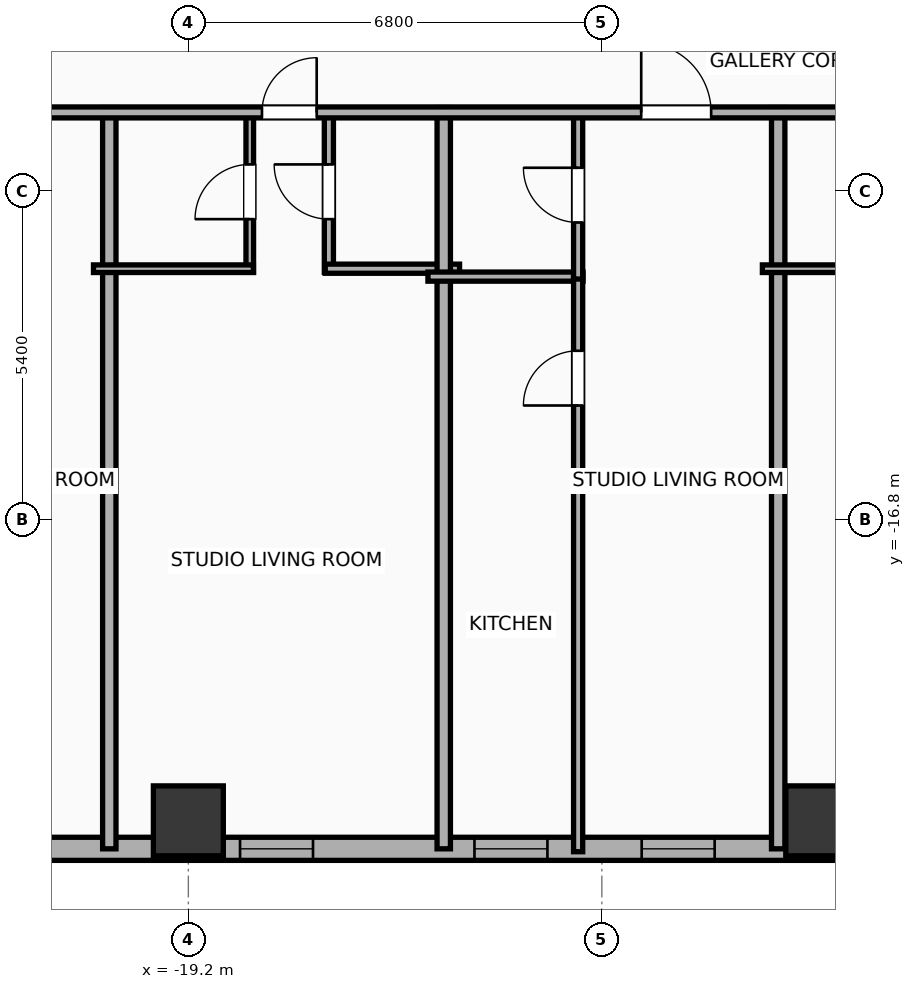
"""IFC4 building model, lengths in metres.
Left out: names, types, materials, properties, quantities, classifications, styles, units other than length and angle.
Written with IfcOpenShell. Run it as: python <this file> out.ifc"""

import sys

from ifc_helpers import new_model, si_unit, direction, frame, frame_2d, origin, origin_2d, place, context, subcontext, project, spatial, rectangle, hollow_rectangle, extrude, element, fill, save


model = new_model("IFC4")
c1 = context("Model", 3, precision=1e-05, world=origin(), true_north=direction((0.0, 1.0)))
c2 = subcontext(c1, "Body", "Model", "MODEL_VIEW")
j1 = project(units=[si_unit("LENGTHUNIT", "METRE"), si_unit("PLANEANGLEUNIT", "RADIAN")], contexts=[c1])
p1 = place(None, origin())
s1 = spatial("IfcSite", under=j1, at=p1, CompositionType="ELEMENT")
p2 = place(p1, origin())
s2 = spatial("IfcBuilding", under=s1, at=p2, CompositionType="ELEMENT")
p3 = place(p2, frame((0.0, 0.0, 33.8)))
s3 = spatial("IfcBuildingStorey", under=s2, at=p3, CompositionType="ELEMENT", Elevation=33.8)
for number, where, z_axis, x_axis in (
    (1, (-19.2, -21.75, 0.0), (0.0, 0.0, 1.0), (1.0, 0.0, 0.0)),
    (2, (-8.8, -21.75, 0.0), (0.0, 0.0, 1.0), (1.0, 0.0, 0.0)),
):
    element("IfcColumn", number, at=place(p3, frame(where, z_axis=z_axis, x_axis=x_axis)), inside=s3, PredefinedType="COLUMN", context=c2, shape_type="SweptSolid", body=[
        extrude(hollow_rectangle(XDim=1.15, YDim=1.15, WallThickness=0.04, at=origin_2d()), origin(), (0.0, 0.0, 1.0), 3.9),
    ])
p4 = place(p3, frame((22.381, -22.21, 0.0), z_axis=(0.0, 0.0, 1.0), x_axis=(-1.0, 0.0, 0.0)))
e3 = element("IfcWall", 3, at=p4, inside=s3, PredefinedType="ELEMENTEDWALL", context=c2, shape_type="SweptSolid", body=[
    extrude(rectangle(XDim=51.963, YDim=0.38, at=frame_2d((25.981, 0.0))), origin(), (0.0, 0.0, 1.0), 3.65),
])
p5 = place(p4, frame((49.127, 0.0, 0.75)))
e4 = element("IfcOpeningElement", 4, at=p5, cuts=e3, PredefinedType="OPENING", context=c2, shape_type="SweptSolid", body=[
    extrude(rectangle(XDim=1.2, YDim=2.05, at=frame_2d((0.6, 1.025))), frame((0.0, 0.2, 0.0), z_axis=(0.0, -1.0, 0.0), x_axis=(1.0, 0.0, 0.0)), (0.0, 0.0, 1.0), 0.4),
])
p6 = place(p4, frame((43.926, 0.0, 0.75)))
e5 = element("IfcOpeningElement", 5, at=p6, cuts=e3, PredefinedType="OPENING", context=c2, shape_type="SweptSolid", body=[
    extrude(rectangle(XDim=1.2, YDim=2.05, at=frame_2d((0.6, 1.025))), frame((0.0, 0.2, 0.0), z_axis=(0.0, -1.0, 0.0), x_axis=(1.0, 0.0, 0.0)), (0.0, 0.0, 1.0), 0.4),
])
p7 = place(p4, frame((46.676, 0.0, 0.75)))
e6 = element("IfcOpeningElement", 6, at=p7, cuts=e3, PredefinedType="OPENING", context=c2, shape_type="SweptSolid", body=[
    extrude(rectangle(XDim=1.2, YDim=2.05, at=frame_2d((0.6, 1.025))), frame((0.0, 0.2, 0.0), z_axis=(0.0, -1.0, 0.0), x_axis=(1.0, 0.0, 0.0)), (0.0, 0.0, 1.0), 0.4),
])
p8 = place(p4, frame((39.531, 0.0, 0.75)))
e7 = element("IfcOpeningElement", 7, at=p8, cuts=e3, PredefinedType="OPENING", context=c2, shape_type="SweptSolid", body=[
    extrude(rectangle(XDim=1.2, YDim=2.05, at=frame_2d((0.6, 1.025))), frame((0.0, 0.2, 0.0), z_axis=(0.0, -1.0, 0.0), x_axis=(1.0, 0.0, 0.0)), (0.0, 0.0, 1.0), 0.4),
])
p9 = place(p4, frame((32.926, 0.0, 0.75)))
e8 = element("IfcOpeningElement", 8, at=p9, cuts=e3, PredefinedType="OPENING", context=c2, shape_type="SweptSolid", body=[
    extrude(rectangle(XDim=1.2, YDim=2.05, at=frame_2d((0.6, 1.025))), frame((0.0, 0.2, 0.0), z_axis=(0.0, -1.0, 0.0), x_axis=(1.0, 0.0, 0.0)), (0.0, 0.0, 1.0), 0.4),
])
p10 = place(p4, frame((35.676, 0.0, 0.75)))
e9 = element("IfcOpeningElement", 9, at=p10, cuts=e3, PredefinedType="OPENING", context=c2, shape_type="SweptSolid", body=[
    extrude(rectangle(XDim=1.2, YDim=2.05, at=frame_2d((0.6, 1.025))), frame((0.0, 0.2, 0.0), z_axis=(0.0, -1.0, 0.0), x_axis=(1.0, 0.0, 0.0)), (0.0, 0.0, 1.0), 0.4),
])
p11 = place(p4, frame((28.531, 0.0, 0.75)))
e10 = element("IfcOpeningElement", 10, at=p11, cuts=e3, PredefinedType="OPENING", context=c2, shape_type="SweptSolid", body=[
    extrude(rectangle(XDim=1.2, YDim=2.05, at=frame_2d((0.6, 1.025))), frame((0.0, 0.2, 0.0), z_axis=(0.0, -1.0, 0.0), x_axis=(1.0, 0.0, 0.0)), (0.0, 0.0, 1.0), 0.4),
])
p12 = place(p4, frame((21.926, 0.0, 0.75)))
e11 = element("IfcOpeningElement", 11, at=p12, cuts=e3, PredefinedType="OPENING", context=c2, shape_type="SweptSolid", body=[
    extrude(rectangle(XDim=1.2, YDim=2.05, at=frame_2d((0.6, 1.025))), frame((0.0, 0.2, 0.0), z_axis=(0.0, -1.0, 0.0), x_axis=(1.0, 0.0, 0.0)), (0.0, 0.0, 1.0), 0.4),
])
p13 = place(p4, frame((24.676, 0.0, 0.75)))
e12 = element("IfcOpeningElement", 12, at=p13, cuts=e3, PredefinedType="OPENING", context=c2, shape_type="SweptSolid", body=[
    extrude(rectangle(XDim=1.2, YDim=2.05, at=frame_2d((0.6, 1.025))), frame((0.0, 0.2, 0.0), z_axis=(0.0, -1.0, 0.0), x_axis=(1.0, 0.0, 0.0)), (0.0, 0.0, 1.0), 0.4),
])
p14 = place(p4, frame((18.636, 0.0, 0.75)))
e13 = element("IfcOpeningElement", 13, at=p14, cuts=e3, PredefinedType="OPENING", context=c2, shape_type="SweptSolid", body=[
    extrude(rectangle(XDim=1.2, YDim=2.05, at=frame_2d((0.6, 1.025))), frame((0.0, 0.2, 0.0), z_axis=(0.0, -1.0, 0.0), x_axis=(1.0, 0.0, 0.0)), (0.0, 0.0, 1.0), 0.4),
])
p15 = place(p4, frame((15.886, 0.0, 0.75)))
e14 = element("IfcOpeningElement", 14, at=p15, cuts=e3, PredefinedType="OPENING", context=c2, shape_type="SweptSolid", body=[
    extrude(rectangle(XDim=1.2, YDim=2.05, at=frame_2d((0.6, 1.025))), frame((0.0, 0.2, 0.0), z_axis=(0.0, -1.0, 0.0), x_axis=(1.0, 0.0, 0.0)), (0.0, 0.0, 1.0), 0.4),
])
p16 = place(p4, frame((12.031, 0.0, 0.75)))
e15 = element("IfcOpeningElement", 15, at=p16, cuts=e3, PredefinedType="OPENING", context=c2, shape_type="SweptSolid", body=[
    extrude(rectangle(XDim=1.2, YDim=2.05, at=frame_2d((0.6, 1.025))), frame((0.0, 0.2, 0.0), z_axis=(0.0, -1.0, 0.0), x_axis=(1.0, 0.0, 0.0)), (0.0, 0.0, 1.0), 0.4),
])
p17 = place(p4, frame((7.636, 0.0, 0.75)))
e16 = element("IfcOpeningElement", 16, at=p17, cuts=e3, PredefinedType="OPENING", context=c2, shape_type="SweptSolid", body=[
    extrude(rectangle(XDim=1.2, YDim=2.05, at=frame_2d((0.6, 1.025))), frame((0.0, 0.2, 0.0), z_axis=(0.0, -1.0, 0.0), x_axis=(1.0, 0.0, 0.0)), (0.0, 0.0, 1.0), 0.4),
])
p18 = place(p4, frame((4.886, 0.0, 0.75)))
e17 = element("IfcOpeningElement", 17, at=p18, cuts=e3, PredefinedType="OPENING", context=c2, shape_type="SweptSolid", body=[
    extrude(rectangle(XDim=1.2, YDim=2.05, at=frame_2d((0.6, 1.025))), frame((0.0, 0.2, 0.0), z_axis=(0.0, -1.0, 0.0), x_axis=(1.0, 0.0, 0.0)), (0.0, 0.0, 1.0), 0.4),
])
p19 = place(p4, frame((2.036, 0.0, 0.75)))
e18 = element("IfcOpeningElement", 18, at=p19, cuts=e3, PredefinedType="OPENING", context=c2, shape_type="SweptSolid", body=[
    extrude(rectangle(XDim=1.2, YDim=2.05, at=frame_2d((0.6, 1.025))), frame((0.0, 0.2, 0.0), z_axis=(0.0, -1.0, 0.0), x_axis=(1.0, 0.0, 0.0)), (0.0, 0.0, 1.0), 0.4),
])
p20 = place(p3, frame((-20.5, -22.21, 0.0), z_axis=(0.0, 0.0, 1.0), x_axis=(0.0, 1.0, 0.0)))
e19 = element("IfcWall", 19, at=p20, inside=s3, PredefinedType="PARTITIONING", context=c2, shape_type="SweptSolid", body=[
    extrude(rectangle(XDim=12.19, YDim=0.22, at=frame_2d((6.095, 0.0))), origin(), (0.0, 0.0, 1.0), 3.65),
])
p21 = place(p3, frame((-18.19, -12.73, 0.0), z_axis=(0.0, 0.0, 1.0), x_axis=(0.0, 1.0, 0.0)))
e20 = element("IfcWall", 20, at=p21, inside=s3, PredefinedType="PARTITIONING", context=c2, shape_type="SweptSolid", body=[
    extrude(rectangle(XDim=2.65, YDim=0.125, at=frame_2d((1.325, 0.0))), origin(), (0.0, 0.0, 1.0), 3.65),
])
p22 = place(p21, frame((0.875, 0.0, 0.0)))
e21 = element("IfcOpeningElement", 21, at=p22, cuts=e20, PredefinedType="OPENING", context=c2, shape_type="SweptSolid", body=[
    extrude(rectangle(XDim=0.9, YDim=2.05, at=frame_2d((0.45, 1.025))), frame((0.0, 0.073, 0.0), z_axis=(0.0, -1.0, 0.0), x_axis=(1.0, 0.0, 0.0)), (0.0, 0.0, 1.0), 0.145),
])
p23 = place(p3, frame((-16.889, -12.73, 0.0), z_axis=(0.0, 0.0, 1.0), x_axis=(0.0, 1.0, 0.0)))
e22 = element("IfcWall", 22, at=p23, inside=s3, PredefinedType="PLUMBINGWALL", context=c2, shape_type="SweptSolid", body=[
    extrude(rectangle(XDim=2.65, YDim=0.15, at=frame_2d((1.325, 0.0))), origin(), (0.0, 0.0, 1.0), 3.65),
])
p24 = place(p23, frame((0.875, 0.0, 0.0)))
e23 = element("IfcOpeningElement", 23, at=p24, cuts=e22, PredefinedType="OPENING", context=c2, shape_type="SweptSolid", body=[
    extrude(rectangle(XDim=0.9, YDim=2.05, at=frame_2d((0.45, 1.025))), frame((0.0, 0.085, 0.0), z_axis=(0.0, -1.0, 0.0), x_axis=(1.0, 0.0, 0.0)), (0.0, 0.0, 1.0), 0.17),
])
p25 = place(p3, frame((-20.76, -12.67, 0.0), z_axis=(0.0, 0.0, 1.0), x_axis=(1.0, 0.0, 0.0)))
e24 = element("IfcWall", 24, at=p25, inside=s3, PredefinedType="PARTITIONING", context=c2, shape_type="SweptSolid", body=[
    extrude(rectangle(XDim=2.63, YDim=0.125, at=frame_2d((1.315, 0.0))), origin(), (0.0, 0.0, 1.0), 3.65),
])
p26 = place(p3, frame((-16.949, -12.67, 0.0), z_axis=(0.0, 0.0, 1.0), x_axis=(1.0, 0.0, 0.0)))
e25 = element("IfcWall", 25, at=p26, inside=s3, PredefinedType="PLUMBINGWALL", context=c2, shape_type="SweptSolid", body=[
    extrude(rectangle(XDim=2.209, YDim=0.15, at=frame_2d((1.104, 0.0))), origin(), (0.0, 0.0, 1.0), 3.65),
])
p27 = place(p3, frame((-15.0, -22.21, 0.0), z_axis=(0.0, 0.0, 1.0), x_axis=(0.0, 1.0, 0.0)))
e26 = element("IfcWall", 26, at=p27, inside=s3, PredefinedType="PARTITIONING", context=c2, shape_type="SweptSolid", body=[
    extrude(rectangle(XDim=12.19, YDim=0.22, at=frame_2d((6.095, 0.0))), origin(), (0.0, 0.0, 1.0), 3.65),
])
p28 = place(p3, frame((-15.26, -12.8, 0.0), z_axis=(0.0, 0.0, 1.0), x_axis=(1.0, 0.0, 0.0)))
e27 = element("IfcWall", 27, at=p28, inside=s3, PredefinedType="PLUMBINGWALL", context=c2, shape_type="SweptSolid", body=[
    extrude(rectangle(XDim=2.55, YDim=0.15, at=frame_2d((1.275, 0.0))), origin(), (0.0, 0.0, 1.0), 3.65),
])
p29 = place(p3, frame((-12.79, -22.258, 0.0), z_axis=(0.0, 0.0, 1.0), x_axis=(0.0, 1.0, 0.0)))
e28 = element("IfcWall", 28, at=p29, inside=s3, PredefinedType="PLUMBINGWALL", context=c2, shape_type="SweptSolid", body=[
    extrude(rectangle(XDim=9.498, YDim=0.15, at=frame_2d((4.749, 0.0))), origin(), (0.0, 0.0, 1.0), 3.65),
])
p30 = place(p29, frame((7.338, 0.0, 0.0)))
e29 = element("IfcOpeningElement", 29, at=p30, cuts=e28, PredefinedType="OPENING", context=c2, shape_type="SweptSolid", body=[
    extrude(rectangle(XDim=0.9, YDim=2.05, at=frame_2d((0.45, 1.025))), frame((0.0, 0.085, 0.0), z_axis=(0.0, -1.0, 0.0), x_axis=(1.0, 0.0, 0.0)), (0.0, 0.0, 1.0), 0.17),
])
p31 = place(p3, frame((-12.79, -12.84, 0.0), z_axis=(0.0, 0.0, 1.0), x_axis=(0.0, 1.0, 0.0)))
e30 = element("IfcWall", 30, at=p31, inside=s3, PredefinedType="PLUMBINGWALL", context=c2, shape_type="SweptSolid", body=[
    extrude(rectangle(XDim=2.76, YDim=0.15, at=frame_2d((1.38, 0.0))), origin(), (0.0, 0.0, 1.0), 3.65),
])
p32 = place(p31, frame((0.93, 0.0, 0.0)))
e31 = element("IfcOpeningElement", 31, at=p32, cuts=e30, PredefinedType="OPENING", context=c2, shape_type="SweptSolid", body=[
    extrude(rectangle(XDim=0.9, YDim=2.05, at=frame_2d((0.45, 1.025))), frame((0.0, 0.085, 0.0), z_axis=(0.0, -1.0, 0.0), x_axis=(1.0, 0.0, 0.0)), (0.0, 0.0, 1.0), 0.17),
])
p33 = place(p3, frame((-9.5, -22.21, 0.0), z_axis=(0.0, 0.0, 1.0), x_axis=(0.0, 1.0, 0.0)))
e32 = element("IfcWall", 32, at=p33, inside=s3, PredefinedType="PARTITIONING", context=c2, shape_type="SweptSolid", body=[
    extrude(rectangle(XDim=12.19, YDim=0.22, at=frame_2d((6.095, 0.0))), origin(), (0.0, 0.0, 1.0), 2.94),
])
p34 = place(p3, frame((-9.76, -12.67, 0.0), z_axis=(0.0, 0.0, 1.0), x_axis=(1.0, 0.0, 0.0)))
e33 = element("IfcWall", 33, at=p34, inside=s3, PredefinedType="PARTITIONING", context=c2, shape_type="SweptSolid", body=[
    extrude(rectangle(XDim=2.63, YDim=0.125, at=frame_2d((1.315, 0.0))), origin(), (0.0, 0.0, 1.0), 3.65),
])
p35 = place(p3, frame((-33.41, -10.1, 0.0), z_axis=(0.0, 0.0, 1.0), x_axis=(1.0, 0.0, 0.0)))
e34 = element("IfcWall", 34, at=p35, inside=s3, PredefinedType="PARTITIONING", context=c2, shape_type="SweptSolid", body=[
    extrude(rectangle(XDim=59.62, YDim=0.18, at=frame_2d((29.81, 0.0))), origin(), (0.0, 0.0, 1.0), 3.65),
])
p36 = place(p35, frame((3.259, 0.0, 0.0)))
e35 = element("IfcOpeningElement", 35, at=p36, cuts=e34, PredefinedType="OPENING", context=c2, shape_type="SweptSolid", body=[
    extrude(rectangle(XDim=1.15, YDim=2.05, at=frame_2d((0.575, 1.025))), frame((0.0, 0.1, 0.0), z_axis=(0.0, -1.0, 0.0), x_axis=(1.0, 0.0, 0.0)), (0.0, 0.0, 1.0), 0.2),
])
p37 = place(p35, frame((10.657, 0.0, 0.0)))
e36 = element("IfcOpeningElement", 36, at=p37, cuts=e34, PredefinedType="OPENING", context=c2, shape_type="SweptSolid", body=[
    extrude(rectangle(XDim=1.15, YDim=2.05, at=frame_2d((0.575, 1.025))), frame((0.0, 0.1, 0.0), z_axis=(0.0, -1.0, 0.0), x_axis=(1.0, 0.0, 0.0)), (0.0, 0.0, 1.0), 0.2),
])
p38 = place(p35, frame((15.421, 0.0, 0.0)))
e37 = element("IfcOpeningElement", 37, at=p38, cuts=e34, PredefinedType="OPENING", context=c2, shape_type="SweptSolid", body=[
    extrude(rectangle(XDim=0.9, YDim=2.05, at=frame_2d((0.45, 1.025))), frame((0.0, 0.1, 0.0), z_axis=(0.0, -1.0, 0.0), x_axis=(1.0, 0.0, 0.0)), (0.0, 0.0, 1.0), 0.2),
])
p39 = place(p35, frame((21.657, 0.0, 0.0)))
e38 = element("IfcOpeningElement", 38, at=p39, cuts=e34, PredefinedType="OPENING", context=c2, shape_type="SweptSolid", body=[
    extrude(rectangle(XDim=1.15, YDim=2.05, at=frame_2d((0.575, 1.025))), frame((0.0, 0.1, 0.0), z_axis=(0.0, -1.0, 0.0), x_axis=(1.0, 0.0, 0.0)), (0.0, 0.0, 1.0), 0.2),
])
p40 = place(p35, frame((26.421, 0.0, 0.0)))
e39 = element("IfcOpeningElement", 39, at=p40, cuts=e34, PredefinedType="OPENING", context=c2, shape_type="SweptSolid", body=[
    extrude(rectangle(XDim=0.9, YDim=2.05, at=frame_2d((0.45, 1.025))), frame((0.0, 0.1, 0.0), z_axis=(0.0, -1.0, 0.0), x_axis=(1.0, 0.0, 0.0)), (0.0, 0.0, 1.0), 0.2),
])
p41 = place(p35, frame((32.657, 0.0, 0.0)))
e40 = element("IfcOpeningElement", 40, at=p41, cuts=e34, PredefinedType="OPENING", context=c2, shape_type="SweptSolid", body=[
    extrude(rectangle(XDim=1.15, YDim=2.05, at=frame_2d((0.575, 1.025))), frame((0.0, 0.1, 0.0), z_axis=(0.0, -1.0, 0.0), x_axis=(1.0, 0.0, 0.0)), (0.0, 0.0, 1.0), 0.2),
])
p42 = place(p35, frame((36.008, 0.0, 0.0)))
e41 = element("IfcOpeningElement", 41, at=p42, cuts=e34, PredefinedType="OPENING", context=c2, shape_type="SweptSolid", body=[
    extrude(rectangle(XDim=1.15, YDim=2.05, at=frame_2d((0.575, 1.025))), frame((0.0, 0.1, 0.0), z_axis=(0.0, -1.0, 0.0), x_axis=(1.0, 0.0, 0.0)), (0.0, 0.0, 1.0), 0.2),
])
p43 = place(p35, frame((42.917, 0.0, 0.0)))
e42 = element("IfcOpeningElement", 42, at=p43, cuts=e34, PredefinedType="OPENING", context=c2, shape_type="SweptSolid", body=[
    extrude(rectangle(XDim=0.9, YDim=2.05, at=frame_2d((0.45, 1.025))), frame((0.0, 0.1, 0.0), z_axis=(0.0, -1.0, 0.0), x_axis=(1.0, 0.0, 0.0)), (0.0, 0.0, 1.0), 0.2),
])
p44 = place(p35, frame((47.008, 0.0, 0.0)))
e43 = element("IfcOpeningElement", 43, at=p44, cuts=e34, PredefinedType="OPENING", context=c2, shape_type="SweptSolid", body=[
    extrude(rectangle(XDim=1.15, YDim=2.05, at=frame_2d((0.575, 1.025))), frame((0.0, 0.1, 0.0), z_axis=(0.0, -1.0, 0.0), x_axis=(1.0, 0.0, 0.0)), (0.0, 0.0, 1.0), 0.2),
])
p45 = place(p35, frame((55.14, 0.0, 0.0)))
e44 = element("IfcOpeningElement", 44, at=p45, cuts=e34, PredefinedType="OPENING", context=c2, shape_type="SweptSolid", body=[
    extrude(rectangle(XDim=1.15, YDim=2.05, at=frame_2d((0.575, 1.025))), frame((0.0, 0.1, 0.0), z_axis=(0.0, -1.0, 0.0), x_axis=(1.0, 0.0, 0.0)), (0.0, 0.0, 1.0), 0.2),
])
p46 = place(p8, origin())
e45 = element("IfcWindow", 45, at=p46, inside=s3, PartitioningType="SINGLE_PANEL", PredefinedType="WINDOW", context=c2, shape_type="SweptSolid", body=[
    extrude(rectangle(XDim=1.2, YDim=2.05, at=frame_2d((0.6, 1.025))), frame((0.0, 0.03, 0.0), z_axis=(0.0, -1.0, 0.0), x_axis=(1.0, 0.0, 0.0)), (0.0, 0.0, 1.0), 0.06),
])
fill(e7, e45)
p47 = place(p9, origin())
e46 = element("IfcWindow", 46, at=p47, inside=s3, PartitioningType="SINGLE_PANEL", PredefinedType="WINDOW", context=c2, shape_type="SweptSolid", body=[
    extrude(rectangle(XDim=1.2, YDim=2.05, at=frame_2d((0.6, 1.025))), frame((0.0, 0.03, 0.0), z_axis=(0.0, -1.0, 0.0), x_axis=(1.0, 0.0, 0.0)), (0.0, 0.0, 1.0), 0.06),
])
fill(e8, e46)
p48 = place(p10, origin())
e47 = element("IfcWindow", 47, at=p48, inside=s3, PartitioningType="SINGLE_PANEL", PredefinedType="WINDOW", context=c2, shape_type="SweptSolid", body=[
    extrude(rectangle(XDim=1.2, YDim=2.05, at=frame_2d((0.6, 1.025))), frame((0.0, 0.03, 0.0), z_axis=(0.0, -1.0, 0.0), x_axis=(1.0, 0.0, 0.0)), (0.0, 0.0, 1.0), 0.06),
])
fill(e9, e47)
p49 = place(p22, origin())
e48 = element("IfcDoor", 48, at=p49, inside=s3, OperationType="SINGLE_SWING_LEFT", PredefinedType="DOOR", context=c2, shape_type="SweptSolid", body=[
    extrude(rectangle(XDim=0.9, YDim=2.05, at=frame_2d((0.45, 1.025))), frame((0.0, 0.025, 0.0), z_axis=(0.0, -1.0, 0.0), x_axis=(1.0, 0.0, 0.0)), (0.0, 0.0, 1.0), 0.05),
])
fill(e21, e48)
p50 = place(p24, origin())
e49 = element("IfcDoor", 49, at=p50, inside=s3, OperationType="SINGLE_SWING_RIGHT", PredefinedType="DOOR", context=c2, shape_type="SweptSolid", body=[
    extrude(rectangle(XDim=0.9, YDim=2.05, at=frame_2d((0.45, 1.025))), frame((0.0, 0.025, 0.0), z_axis=(0.0, -1.0, 0.0), x_axis=(1.0, 0.0, 0.0)), (0.0, 0.0, 1.0), 0.05),
])
fill(e23, e49)
p51 = place(p30, origin())
e50 = element("IfcDoor", 50, at=p51, inside=s3, OperationType="SINGLE_SWING_LEFT", PredefinedType="DOOR", context=c2, shape_type="SweptSolid", body=[
    extrude(rectangle(XDim=0.9, YDim=2.05, at=frame_2d((0.45, 1.025))), frame((0.0, 0.025, 0.0), z_axis=(0.0, -1.0, 0.0), x_axis=(1.0, 0.0, 0.0)), (0.0, 0.0, 1.0), 0.05),
])
fill(e29, e50)
p52 = place(p32, origin())
e51 = element("IfcDoor", 51, at=p52, inside=s3, OperationType="SINGLE_SWING_RIGHT", PredefinedType="DOOR", context=c2, shape_type="SweptSolid", body=[
    extrude(rectangle(XDim=0.9, YDim=2.05, at=frame_2d((0.45, 1.025))), frame((0.0, 0.025, 0.0), z_axis=(0.0, -1.0, 0.0), x_axis=(1.0, 0.0, 0.0)), (0.0, 0.0, 1.0), 0.05),
])
fill(e31, e51)
p53 = place(p38, origin())
e52 = element("IfcDoor", 52, at=p53, inside=s3, OperationType="SINGLE_SWING_RIGHT", PredefinedType="DOOR", context=c2, shape_type="SweptSolid", body=[
    extrude(rectangle(XDim=0.9, YDim=2.05, at=frame_2d((0.45, 1.025))), frame((0.0, 0.025, 0.0), z_axis=(0.0, -1.0, 0.0), x_axis=(1.0, 0.0, 0.0)), (0.0, 0.0, 1.0), 0.05),
])
fill(e37, e52)
p54 = place(p39, origin())
e53 = element("IfcDoor", 53, at=p54, inside=s3, OperationType="SINGLE_SWING_LEFT", PredefinedType="DOOR", context=c2, shape_type="SweptSolid", body=[
    extrude(rectangle(XDim=1.15, YDim=2.05, at=frame_2d((0.575, 1.025))), frame((0.0, 0.025, 0.0), z_axis=(0.0, -1.0, 0.0), x_axis=(1.0, 0.0, 0.0)), (0.0, 0.0, 1.0), 0.05),
])
fill(e38, e53)
save(model, sys.argv[1])
